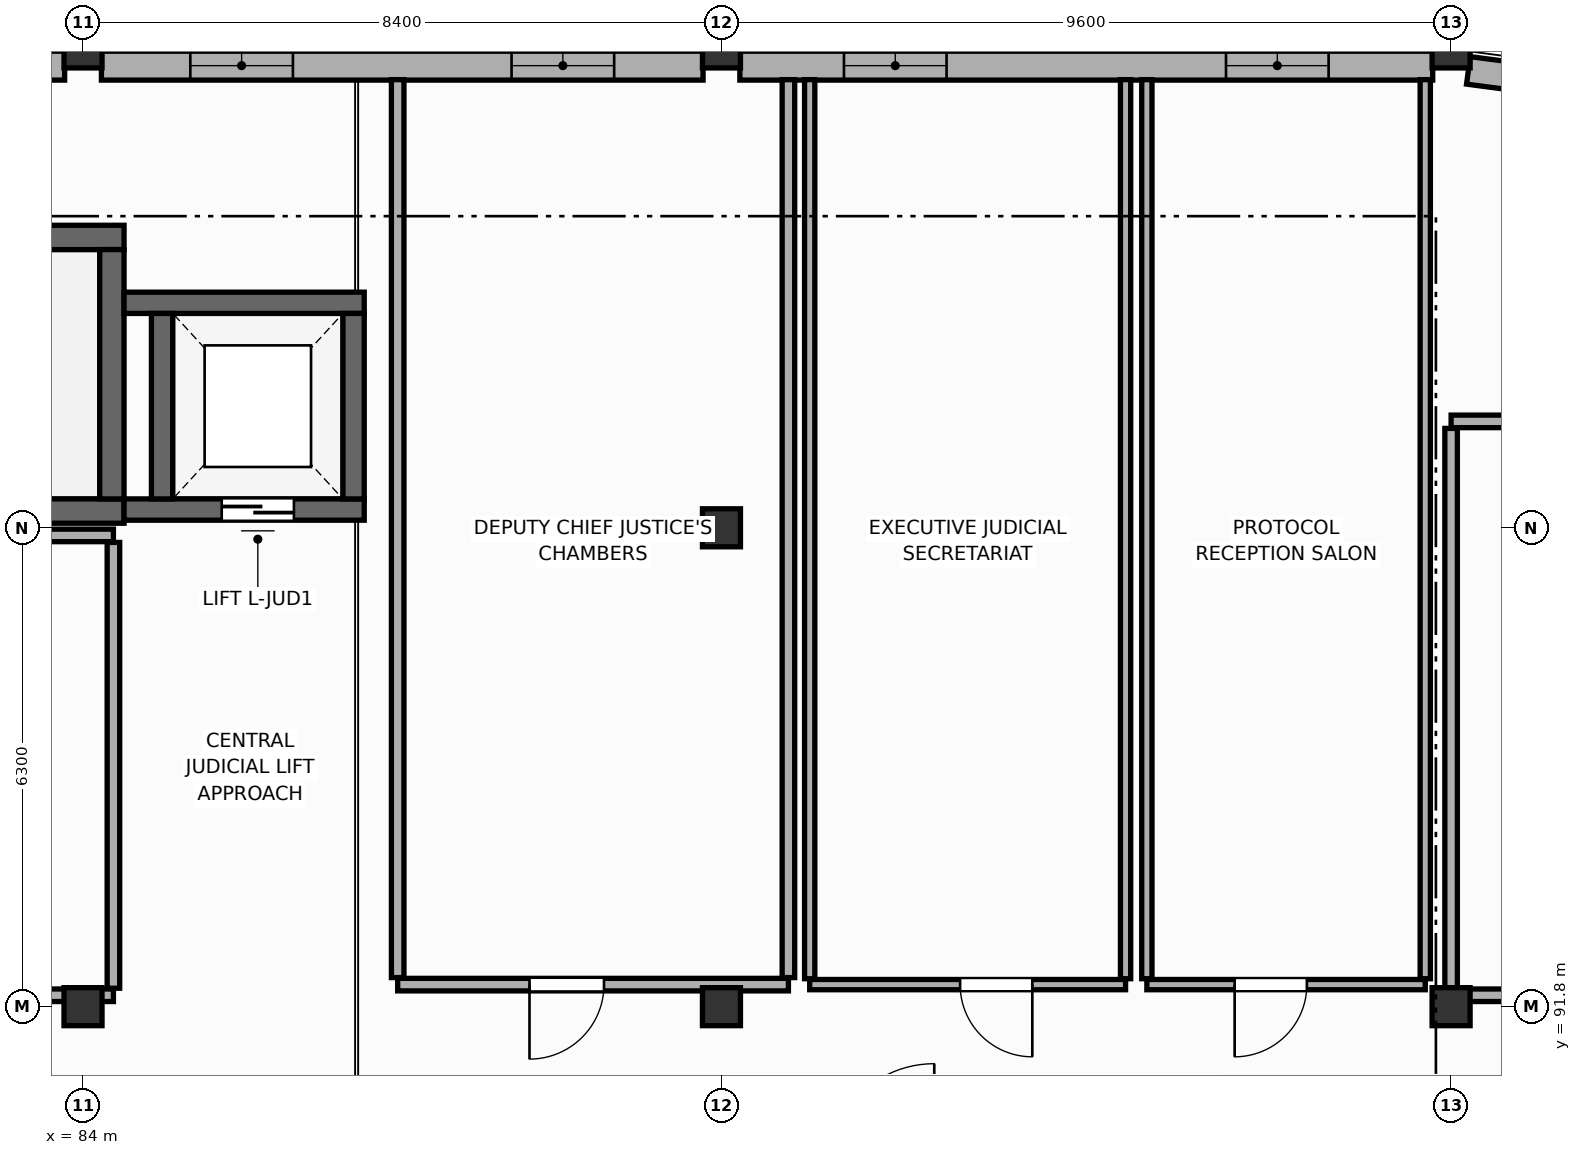
"""IFC4 building model, lengths in metres.
Left out: names, types, materials, properties, quantities, classifications, styles, units other than length and angle.
Written with IfcOpenShell. Run it as: python <this file> out.ifc"""

import sys

from ifc_helpers import new_model, si_unit, direction, frame, frame_2d, origin, origin_2d, place, context, subcontext, project, spatial, rectangle, extrude, element, fill, save


model = new_model("IFC4")
c1 = context("Model", 3, precision=1e-05, world=origin(), true_north=direction((0.0, 1.0)))
c2 = subcontext(c1, "Body", "Model", "MODEL_VIEW")
j1 = project(units=[si_unit("LENGTHUNIT", "METRE"), si_unit("PLANEANGLEUNIT", "RADIAN")], contexts=[c1])
p1 = place(None, origin())
s1 = spatial("IfcSite", under=j1, at=p1, CompositionType="ELEMENT")
p2 = place(p1, origin())
s2 = spatial("IfcBuilding", under=s1, at=p2, CompositionType="ELEMENT")
p3 = place(p2, frame((0.0, 0.0, 31.2)))
s3 = spatial("IfcBuildingStorey", under=s2, at=p3, CompositionType="ELEMENT", Elevation=31.2)
for number, where, z_axis, x_axis in (
    (1, (84.0, 91.8, 0.0), (0.0, 0.0, 1.0), (1.0, 0.0, 0.0)),
    (2, (84.0, 104.4, 0.0), (0.0, 0.0, 1.0), (1.0, 0.0, 0.0)),
    (3, (92.4, 91.8, 0.0), (0.0, 0.0, 1.0), (1.0, 0.0, 0.0)),
    (4, (92.4, 104.4, 0.0), (0.0, 0.0, 1.0), (1.0, 0.0, 0.0)),
    (5, (92.4, 98.1, 0.0), (0.0, 0.0, 1.0), (1.0, 0.0, 0.0)),
    (6, (102.0, 91.8, 0.0), (0.0, 0.0, 1.0), (1.0, 0.0, 0.0)),
    (7, (102.0, 104.4, 0.0), (0.0, 0.0, 1.0), (1.0, 0.0, 0.0)),
):
    element("IfcColumn", number, at=place(p3, frame(where, z_axis=z_axis, x_axis=x_axis)), inside=s3, PredefinedType="COLUMN", context=c2, shape_type="SweptSolid", body=[
        extrude(rectangle(XDim=0.5, YDim=0.5, at=origin_2d()), origin(), (0.0, 0.0, 1.0), 4.2),
    ])
p4 = place(p3, frame((75.842, 104.18, 0.0), z_axis=(0.0, 0.0, 1.0), x_axis=(1.0, 0.0, 0.0)))
e8 = element("IfcWall", 8, at=p4, inside=s3, PredefinedType="STANDARD", context=c2, shape_type="SweptSolid", body=[
    extrude(rectangle(XDim=7.916, YDim=0.38, at=frame_2d((3.958, 0.0))), origin(), (0.0, 0.0, 1.0), 3.11),
])
p5 = place(p3, frame((84.242, 104.18, 0.0), z_axis=(0.0, 0.0, 1.0), x_axis=(1.0, 0.0, 0.0)))
e9 = element("IfcWall", 9, at=p5, inside=s3, PredefinedType="STANDARD", context=c2, shape_type="SweptSolid", body=[
    extrude(rectangle(XDim=7.916, YDim=0.38, at=frame_2d((3.958, 0.0))), origin(), (0.0, 0.0, 1.0), 3.11),
])
p6 = place(p5, frame((1.17, 0.0, 0.85)))
e10 = element("IfcOpeningElement", 10, at=p6, cuts=e9, PredefinedType="OPENING", context=c2, shape_type="SweptSolid", body=[
    extrude(rectangle(XDim=1.35, YDim=1.95, at=frame_2d((0.675, 0.975))), frame((0.0, 0.2, 0.0), z_axis=(0.0, -1.0, 0.0), x_axis=(1.0, 0.0, 0.0)), (0.0, 0.0, 1.0), 0.4),
])
p7 = place(p5, frame((5.396, 0.0, 0.85)))
e11 = element("IfcOpeningElement", 11, at=p7, cuts=e9, PredefinedType="OPENING", context=c2, shape_type="SweptSolid", body=[
    extrude(rectangle(XDim=1.35, YDim=1.95, at=frame_2d((0.675, 0.975))), frame((0.0, 0.2, 0.0), z_axis=(0.0, -1.0, 0.0), x_axis=(1.0, 0.0, 0.0)), (0.0, 0.0, 1.0), 0.4),
])
p8 = place(p3, frame((92.642, 104.18, 0.0), z_axis=(0.0, 0.0, 1.0), x_axis=(1.0, 0.0, 0.0)))
e12 = element("IfcWall", 12, at=p8, inside=s3, PredefinedType="STANDARD", context=c2, shape_type="SweptSolid", body=[
    extrude(rectangle(XDim=9.116, YDim=0.38, at=frame_2d((4.558, 0.0))), origin(), (0.0, 0.0, 1.0), 3.11),
])
p9 = place(p8, frame((1.37, 0.0, 0.85)))
e13 = element("IfcOpeningElement", 13, at=p9, cuts=e12, PredefinedType="OPENING", context=c2, shape_type="SweptSolid", body=[
    extrude(rectangle(XDim=1.35, YDim=1.95, at=frame_2d((0.675, 0.975))), frame((0.0, 0.2, 0.0), z_axis=(0.0, -1.0, 0.0), x_axis=(1.0, 0.0, 0.0)), (0.0, 0.0, 1.0), 0.4),
])
p10 = place(p8, frame((6.396, 0.0, 0.85)))
e14 = element("IfcOpeningElement", 14, at=p10, cuts=e12, PredefinedType="OPENING", context=c2, shape_type="SweptSolid", body=[
    extrude(rectangle(XDim=1.35, YDim=1.95, at=frame_2d((0.675, 0.975))), frame((0.0, 0.2, 0.0), z_axis=(0.0, -1.0, 0.0), x_axis=(1.0, 0.0, 0.0)), (0.0, 0.0, 1.0), 0.4),
])
p11 = place(p3, frame((105.229, 103.723, 0.0), z_axis=(0.0, 0.0, 1.0), x_axis=(-0.991450452257, 0.130483718216, 0.0)))
e15 = element("IfcWall", 15, at=p11, inside=s3, PredefinedType="ELEMENTEDWALL", context=c2, shape_type="SweptSolid", body=[
    extrude(rectangle(XDim=3.027, YDim=0.365, at=frame_2d((1.514, 0.0))), origin(), (0.0, 0.0, 1.0), 3.11),
])
p12 = place(p11, frame((1.1, 0.0, 0.85)))
e16 = element("IfcOpeningElement", 16, at=p12, cuts=e15, PredefinedType="OPENING", context=c2, shape_type="SweptSolid", body=[
    extrude(rectangle(XDim=0.8, YDim=1.7, at=frame_2d((0.4, 0.85))), frame((0.0, 0.192, 0.0), z_axis=(0.0, -1.0, 0.0), x_axis=(1.0, 0.0, 0.0)), (0.0, 0.0, 1.0), 0.385),
])
for number, where, z_axis, x_axis in (
    (17, (75.46, 101.92, 0.0), (0.0, 0.0, 1.0), (1.0, 0.0, 0.0)),
    (18, (84.54, 98.32, 0.0), (0.0, 0.0, 1.0), (-1.0, 0.0, 0.0)),
):
    element("IfcWall", number, at=place(p3, frame(where, z_axis=z_axis, x_axis=x_axis)), inside=s3, PredefinedType="SHEAR", context=c2, shape_type="SweptSolid", body=[
        extrude(rectangle(XDim=9.08, YDim=0.32, at=frame_2d((4.54, 0.0))), origin(), (0.0, 0.0, 1.0), 3.98),
    ])
p13 = place(p3, frame((84.38, 101.76, 0.0), z_axis=(0.0, 0.0, 1.0), x_axis=(0.0, -1.0, 0.0)))
e19 = element("IfcWall", 19, at=p13, inside=s3, PredefinedType="SHEAR", context=c2, shape_type="SweptSolid", body=[
    extrude(rectangle(XDim=3.28, YDim=0.32, at=frame_2d((1.64, 0.0))), origin(), (0.0, 0.0, 1.0), 3.98),
])
p14 = place(p3, frame((84.54, 101.06, 0.0), z_axis=(0.0, 0.0, 1.0), x_axis=(1.0, 0.0, 0.0)))
e20 = element("IfcWall", 20, at=p14, inside=s3, PredefinedType="SHEAR", context=c2, shape_type="SweptSolid", body=[
    extrude(rectangle(XDim=3.16, YDim=0.28, at=frame_2d((1.58, 0.0))), origin(), (0.0, 0.0, 1.0), 3.98),
])
p15 = place(p3, frame((87.7, 98.34, 0.0), z_axis=(0.0, 0.0, 1.0), x_axis=(-1.0, 0.0, 0.0)))
e21 = element("IfcWall", 21, at=p15, inside=s3, PredefinedType="SHEAR", context=c2, shape_type="SweptSolid", body=[
    extrude(rectangle(XDim=3.16, YDim=0.28, at=frame_2d((1.58, 0.0))), origin(), (0.0, 0.0, 1.0), 3.98),
])
p16 = place(p15, frame((0.925, 0.0, 0.0)))
e22 = element("IfcOpeningElement", 22, at=p16, cuts=e21, PredefinedType="OPENING", context=c2, shape_type="SweptSolid", body=[
    extrude(rectangle(XDim=0.95, YDim=2.15, at=frame_2d((0.475, 1.075))), frame((0.0, 0.15, 0.0), z_axis=(0.0, -1.0, 0.0), x_axis=(1.0, 0.0, 0.0)), (0.0, 0.0, 1.0), 0.3),
])
for number, where, z_axis, x_axis in (
    (23, (85.04, 98.48, 0.0), (0.0, 0.0, 1.0), (0.0, 1.0, 0.0)),
    (24, (87.56, 100.92, 0.0), (0.0, 0.0, 1.0), (0.0, -1.0, 0.0)),
):
    element("IfcWall", number, at=place(p3, frame(where, z_axis=z_axis, x_axis=x_axis)), inside=s3, PredefinedType="SHEAR", context=c2, shape_type="SweptSolid", body=[
        extrude(rectangle(XDim=2.44, YDim=0.28, at=frame_2d((1.22, 0.0))), origin(), (0.0, 0.0, 1.0), 3.98),
    ])
p17 = place(p3, frame((75.6, 98.0, 0.0), z_axis=(0.0, 0.0, 1.0), x_axis=(1.0, 0.0, 0.0)))
e25 = element("IfcWall", 25, at=p17, inside=s3, PredefinedType="PARTITIONING", context=c2, shape_type="SweptSolid", body=[
    extrude(rectangle(XDim=8.8, YDim=0.165, at=frame_2d((4.4, 0.0))), origin(), (0.0, 0.0, 1.0), 3.11),
])
p18 = place(p3, frame((84.4, 91.95, 0.0), z_axis=(0.0, 0.0, 1.0), x_axis=(-1.0, 0.0, 0.0)))
e26 = element("IfcWall", 26, at=p18, inside=s3, PredefinedType="PARTITIONING", context=c2, shape_type="SweptSolid", body=[
    extrude(rectangle(XDim=8.8, YDim=0.165, at=frame_2d((4.4, 0.0))), origin(), (0.0, 0.0, 1.0), 3.11),
])
p19 = place(p18, frame((3.19, 0.0, 0.0)))
e27 = element("IfcOpeningElement", 27, at=p19, cuts=e26, PredefinedType="OPENING", context=c2, shape_type="SweptSolid", body=[
    extrude(rectangle(XDim=1.0, YDim=2.15, at=frame_2d((0.5, 1.075))), frame((0.0, 0.093, 0.0), z_axis=(0.0, -1.0, 0.0), x_axis=(1.0, 0.0, 0.0)), (0.0, 0.0, 1.0), 0.185),
])
p20 = place(p3, frame((84.4, 97.907, 0.0), z_axis=(0.0, 0.0, 1.0), x_axis=(0.0, -1.0, 0.0)))
e28 = element("IfcWall", 28, at=p20, inside=s3, PredefinedType="PARTITIONING", context=c2, shape_type="SweptSolid", body=[
    extrude(rectangle(XDim=5.865, YDim=0.165, at=frame_2d((2.933, 0.0))), origin(), (0.0, 0.0, 1.0), 3.11),
])
p21 = place(p3, frame((93.281, 92.09, 0.0), z_axis=(0.0, 0.0, 1.0), x_axis=(-1.0, 0.0, 0.0)))
e29 = element("IfcWall", 29, at=p21, inside=s3, PredefinedType="PARTITIONING", context=c2, shape_type="SweptSolid", body=[
    extrude(rectangle(XDim=5.141, YDim=0.165, at=frame_2d((2.571, 0.0))), origin(), (0.0, 0.0, 1.0), 3.31),
])
p22 = place(p21, frame((2.427, 0.0, 0.0)))
e30 = element("IfcOpeningElement", 30, at=p22, cuts=e29, PredefinedType="OPENING", context=c2, shape_type="SweptSolid", body=[
    extrude(rectangle(XDim=0.98, YDim=2.2, at=frame_2d((0.49, 1.1))), frame((0.0, 0.093, 0.0), z_axis=(0.0, -1.0, 0.0), x_axis=(1.0, 0.0, 0.0)), (0.0, 0.0, 1.0), 0.185),
])
p23 = place(p3, frame((88.14, 92.183, 0.0), z_axis=(0.0, 0.0, 1.0), x_axis=(0.0, 1.0, 0.0)))
e31 = element("IfcWall", 31, at=p23, inside=s3, PredefinedType="PARTITIONING", context=c2, shape_type="SweptSolid", body=[
    extrude(rectangle(XDim=11.813, YDim=0.165, at=frame_2d((5.907, 0.0))), origin(), (0.0, 0.0, 1.0), 3.41),
])
p24 = place(p3, frame((93.281, 103.996, 0.0), z_axis=(0.0, 0.0, 1.0), x_axis=(0.0, -1.0, 0.0)))
e32 = element("IfcWall", 32, at=p24, inside=s3, PredefinedType="PARTITIONING", context=c2, shape_type="SweptSolid", body=[
    extrude(rectangle(XDim=11.813, YDim=0.165, at=frame_2d((5.907, 0.0))), origin(), (0.0, 0.0, 1.0), 3.31),
])
p25 = place(p3, frame((97.717, 92.09, 0.0), z_axis=(0.0, 0.0, 1.0), x_axis=(-1.0, 0.0, 0.0)))
e33 = element("IfcWall", 33, at=p25, inside=s3, PredefinedType="PARTITIONING", context=c2, shape_type="SweptSolid", body=[
    extrude(rectangle(XDim=4.156, YDim=0.135, at=frame_2d((2.078, 0.0))), origin(), (0.0, 0.0, 1.0), 3.31),
])
p26 = place(p25, frame((1.227, 0.0, 0.0)))
e34 = element("IfcOpeningElement", 34, at=p26, cuts=e33, PredefinedType="OPENING", context=c2, shape_type="SweptSolid", body=[
    extrude(rectangle(XDim=0.95, YDim=2.15, at=frame_2d((0.475, 1.075))), frame((0.0, 0.077, 0.0), z_axis=(0.0, -1.0, 0.0), x_axis=(1.0, 0.0, 0.0)), (0.0, 0.0, 1.0), 0.155),
])
for number, where, z_axis, x_axis in (
    (35, (93.561, 92.167, 0.0), (0.0, 0.0, 1.0), (0.0, 1.0, 0.0)),
    (36, (97.717, 103.996, 0.0), (0.0, 0.0, 1.0), (0.0, -1.0, 0.0)),
):
    element("IfcWall", number, at=place(p3, frame(where, z_axis=z_axis, x_axis=x_axis)), inside=s3, PredefinedType="PARTITIONING", context=c2, shape_type="SweptSolid", body=[
        extrude(rectangle(XDim=11.829, YDim=0.135, at=frame_2d((5.914, 0.0))), origin(), (0.0, 0.0, 1.0), 3.31),
    ])
p27 = place(p3, frame((101.66, 92.09, 0.0), z_axis=(0.0, 0.0, 1.0), x_axis=(-1.0, 0.0, 0.0)))
e37 = element("IfcWall", 37, at=p27, inside=s3, PredefinedType="PARTITIONING", context=c2, shape_type="SweptSolid", body=[
    extrude(rectangle(XDim=3.663, YDim=0.135, at=frame_2d((1.832, 0.0))), origin(), (0.0, 0.0, 1.0), 3.11),
])
p28 = place(p27, frame((1.558, 0.0, 0.0)))
e38 = element("IfcOpeningElement", 38, at=p28, cuts=e37, PredefinedType="OPENING", context=c2, shape_type="SweptSolid", body=[
    extrude(rectangle(XDim=0.95, YDim=2.15, at=frame_2d((0.475, 1.075))), frame((0.0, 0.077, 0.0), z_axis=(0.0, -1.0, 0.0), x_axis=(1.0, 0.0, 0.0)), (0.0, 0.0, 1.0), 0.155),
])
p29 = place(p3, frame((97.997, 92.167, 0.0), z_axis=(0.0, 0.0, 1.0), x_axis=(0.0, 1.0, 0.0)))
e39 = element("IfcWall", 39, at=p29, inside=s3, PredefinedType="PARTITIONING", context=c2, shape_type="SweptSolid", body=[
    extrude(rectangle(XDim=11.829, YDim=0.135, at=frame_2d((5.914, 0.0))), origin(), (0.0, 0.0, 1.0), 3.31),
])
p30 = place(p3, frame((101.66, 103.996, 0.0), z_axis=(0.0, 0.0, 1.0), x_axis=(0.0, -1.0, 0.0)))
e40 = element("IfcWall", 40, at=p30, inside=s3, PredefinedType="PARTITIONING", context=c2, shape_type="SweptSolid", body=[
    extrude(rectangle(XDim=11.829, YDim=0.135, at=frame_2d((5.914, 0.0))), origin(), (0.0, 0.0, 1.0), 3.11),
])
p31 = place(p3, frame((102.0, 99.5, 0.0), z_axis=(0.0, 0.0, 1.0), x_axis=(1.0, 0.0, 0.0)))
e41 = element("IfcWall", 41, at=p31, inside=s3, PredefinedType="PARTITIONING", context=c2, shape_type="SweptSolid", body=[
    extrude(rectangle(XDim=9.5, YDim=0.165, at=frame_2d((4.75, 0.0))), origin(), (0.0, 0.0, 1.0), 3.01),
])
p32 = place(p3, frame((111.5, 91.95, 0.0), z_axis=(0.0, 0.0, 1.0), x_axis=(-1.0, 0.0, 0.0)))
e42 = element("IfcWall", 42, at=p32, inside=s3, PredefinedType="PARTITIONING", context=c2, shape_type="SweptSolid", body=[
    extrude(rectangle(XDim=9.5, YDim=0.165, at=frame_2d((4.75, 0.0))), origin(), (0.0, 0.0, 1.0), 3.01),
])
p33 = place(p32, frame((1.132, 0.0, 0.0)))
e43 = element("IfcOpeningElement", 43, at=p33, cuts=e42, PredefinedType="OPENING", context=c2, shape_type="SweptSolid", body=[
    extrude(rectangle(XDim=0.98, YDim=2.2, at=frame_2d((0.49, 1.1))), frame((0.0, 0.093, 0.0), z_axis=(0.0, -1.0, 0.0), x_axis=(1.0, 0.0, 0.0)), (0.0, 0.0, 1.0), 0.185),
])
p34 = place(p3, frame((102.0, 92.042, 0.0), z_axis=(0.0, 0.0, 1.0), x_axis=(0.0, 1.0, 0.0)))
e44 = element("IfcWall", 44, at=p34, inside=s3, PredefinedType="PARTITIONING", context=c2, shape_type="SweptSolid", body=[
    extrude(rectangle(XDim=7.365, YDim=0.165, at=frame_2d((3.683, 0.0))), origin(), (0.0, 0.0, 1.0), 3.11),
])
p35 = place(p6, origin())
e45 = element("IfcWindow", 45, at=p35, inside=s3, PartitioningType="SINGLE_PANEL", PredefinedType="WINDOW", context=c2, shape_type="SweptSolid", body=[
    extrude(rectangle(XDim=1.35, YDim=1.95, at=frame_2d((0.675, 0.975))), frame((0.0, 0.03, 0.0), z_axis=(0.0, -1.0, 0.0), x_axis=(1.0, 0.0, 0.0)), (0.0, 0.0, 1.0), 0.06),
])
fill(e10, e45)
p36 = place(p7, origin())
e46 = element("IfcWindow", 46, at=p36, inside=s3, PartitioningType="SINGLE_PANEL", PredefinedType="WINDOW", context=c2, shape_type="SweptSolid", body=[
    extrude(rectangle(XDim=1.35, YDim=1.95, at=frame_2d((0.675, 0.975))), frame((0.0, 0.03, 0.0), z_axis=(0.0, -1.0, 0.0), x_axis=(1.0, 0.0, 0.0)), (0.0, 0.0, 1.0), 0.06),
])
fill(e11, e46)
p37 = place(p9, origin())
e47 = element("IfcWindow", 47, at=p37, inside=s3, PartitioningType="SINGLE_PANEL", PredefinedType="WINDOW", context=c2, shape_type="SweptSolid", body=[
    extrude(rectangle(XDim=1.35, YDim=1.95, at=frame_2d((0.675, 0.975))), frame((0.0, 0.03, 0.0), z_axis=(0.0, -1.0, 0.0), x_axis=(1.0, 0.0, 0.0)), (0.0, 0.0, 1.0), 0.06),
])
fill(e13, e47)
p38 = place(p10, origin())
e48 = element("IfcWindow", 48, at=p38, inside=s3, PartitioningType="SINGLE_PANEL", PredefinedType="WINDOW", context=c2, shape_type="SweptSolid", body=[
    extrude(rectangle(XDim=1.35, YDim=1.95, at=frame_2d((0.675, 0.975))), frame((0.0, 0.03, 0.0), z_axis=(0.0, -1.0, 0.0), x_axis=(1.0, 0.0, 0.0)), (0.0, 0.0, 1.0), 0.06),
])
fill(e14, e48)
p39 = place(p16, origin())
e49 = element("IfcDoor", 49, at=p39, inside=s3, OperationType="DOUBLE_DOOR_SLIDING", PredefinedType="DOOR", context=c2, shape_type="SweptSolid", body=[
    extrude(rectangle(XDim=0.95, YDim=2.15, at=frame_2d((0.475, 1.075))), frame((0.0, 0.025, 0.0), z_axis=(0.0, -1.0, 0.0), x_axis=(1.0, 0.0, 0.0)), (0.0, 0.0, 1.0), 0.05),
])
fill(e22, e49)
p40 = place(p22, origin())
e50 = element("IfcDoor", 50, at=p40, inside=s3, OperationType="SINGLE_SWING_RIGHT", PredefinedType="DOOR", context=c2, shape_type="SweptSolid", body=[
    extrude(rectangle(XDim=0.98, YDim=2.2, at=frame_2d((0.49, 1.1))), frame((0.0, 0.025, 0.0), z_axis=(0.0, -1.0, 0.0), x_axis=(1.0, 0.0, 0.0)), (0.0, 0.0, 1.0), 0.05),
])
fill(e30, e50)
p41 = place(p26, origin())
e51 = element("IfcDoor", 51, at=p41, inside=s3, OperationType="SINGLE_SWING_LEFT", PredefinedType="DOOR", context=c2, shape_type="SweptSolid", body=[
    extrude(rectangle(XDim=0.95, YDim=2.15, at=frame_2d((0.475, 1.075))), frame((0.0, 0.025, 0.0), z_axis=(0.0, -1.0, 0.0), x_axis=(1.0, 0.0, 0.0)), (0.0, 0.0, 1.0), 0.05),
])
fill(e34, e51)
p42 = place(p28, origin())
e52 = element("IfcDoor", 52, at=p42, inside=s3, OperationType="SINGLE_SWING_RIGHT", PredefinedType="DOOR", context=c2, shape_type="SweptSolid", body=[
    extrude(rectangle(XDim=0.95, YDim=2.15, at=frame_2d((0.475, 1.075))), frame((0.0, 0.025, 0.0), z_axis=(0.0, -1.0, 0.0), x_axis=(1.0, 0.0, 0.0)), (0.0, 0.0, 1.0), 0.05),
])
fill(e38, e52)
save(model, sys.argv[1])
